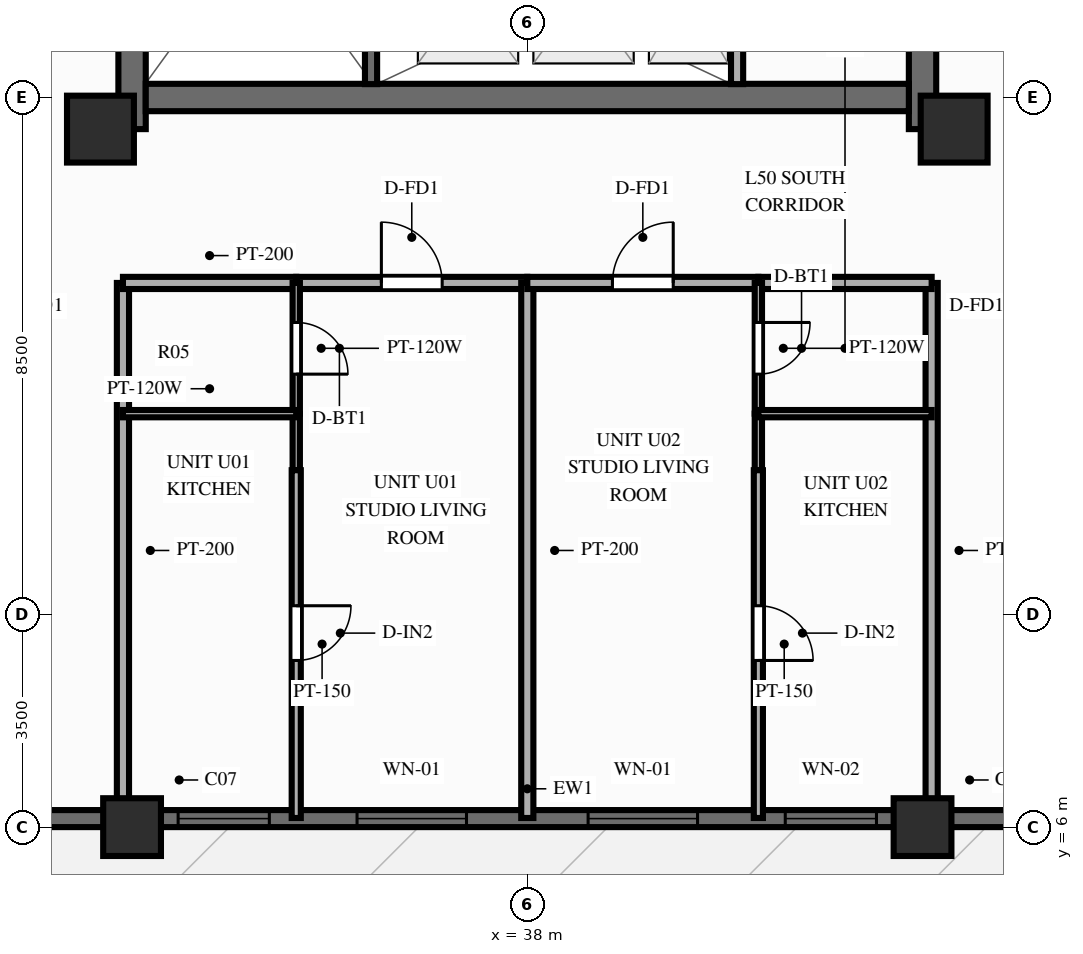
"""IFC4 building model, lengths in metres.
Left out: names, types, materials, properties, quantities, classifications, styles, units other than length and angle.
Written with IfcOpenShell. Run it as: python <this file> out.ifc"""

import sys

from ifc_helpers import new_model, si_unit, direction, frame, frame_2d, origin, origin_2d, place, context, subcontext, project, spatial, rectangle, extrude, source, transform, mapped, element, fill, save


model = new_model("IFC4")
c1 = context("Model", 3, precision=1e-05, world=origin(), true_north=direction((0.0, 1.0)))
c2 = subcontext(c1, "Body", "Model", "MODEL_VIEW")
j1 = project(units=[si_unit("LENGTHUNIT", "METRE"), si_unit("PLANEANGLEUNIT", "RADIAN")], contexts=[c1])
p1 = place(None, origin())
s1 = spatial("IfcSite", under=j1, at=p1, CompositionType="ELEMENT")
p2 = place(p1, origin())
s2 = spatial("IfcBuilding", under=s1, at=p2, CompositionType="ELEMENT")
p3 = place(p2, frame((0.0, 0.0, 159.1)))
s3 = spatial("IfcBuildingStorey", under=s2, at=p3, CompositionType="ELEMENT", Elevation=159.1)
p4 = place(p3, frame((31.5, 17.48, 0.0), z_axis=(0.0, 0.0, 1.0), x_axis=(0.0, 1.0, 0.0)))
e1 = element("IfcWall", 1, at=p4, inside=s3, PredefinedType="SHEAR", context=c2, shape_type="SweptSolid", body=[
    extrude(rectangle(XDim=19.04, YDim=0.45, at=frame_2d((9.52, 0.0))), origin(), (0.0, 0.0, 1.0), 3.9),
])
p5 = place(p4, frame((6.32, 0.0, 0.0)))
e2 = element("IfcOpeningElement", 2, at=p5, cuts=e1, PredefinedType="OPENING", context=c2, shape_type="SweptSolid", body=[
    extrude(rectangle(XDim=1.1, YDim=2.15, at=frame_2d((0.55, 1.075))), frame((0.0, 0.237, 0.0), z_axis=(0.0, -1.0, 0.0), x_axis=(1.0, 0.0, 0.0)), (0.0, 0.0, 1.0), 0.474),
])
p6 = place(p3, frame((44.5, 17.48, 0.0), z_axis=(0.0, 0.0, 1.0), x_axis=(0.0, 1.0, 0.0)))
e3 = element("IfcWall", 3, at=p6, inside=s3, PredefinedType="SHEAR", context=c2, shape_type="SweptSolid", body=[
    extrude(rectangle(XDim=19.04, YDim=0.45, at=frame_2d((9.52, 0.0))), origin(), (0.0, 0.0, 1.0), 3.9),
])
p7 = place(p6, frame((12.67, 0.0, 0.0), z_axis=(0.0, 0.0, 1.0), x_axis=(-1.0, 0.0, 0.0)))
e4 = element("IfcOpeningElement", 4, at=p7, cuts=e3, PredefinedType="OPENING", context=c2, shape_type="SweptSolid", body=[
    extrude(rectangle(XDim=1.1, YDim=2.15, at=frame_2d((0.55, 1.075))), frame((0.0, 0.237, 0.0), z_axis=(0.0, -1.0, 0.0), x_axis=(1.0, 0.0, 0.0)), (0.0, 0.0, 1.0), 0.474),
])
p8 = place(p3, frame((31.725, 18.0, 0.0), z_axis=(0.0, 0.0, 1.0), x_axis=(1.0, 0.0, 0.0)))
e5 = element("IfcWall", 5, at=p8, inside=s3, PredefinedType="SHEAR", context=c2, shape_type="SweptSolid", body=[
    extrude(rectangle(XDim=12.55, YDim=0.45, at=frame_2d((6.275, 0.0))), origin(), (0.0, 0.0, 1.0), 3.9),
])
m1 = source(origin(), c2, "Body", "SweptSolid", [
    extrude(rectangle(XDim=1.1, YDim=1.1, at=origin_2d()), origin(), (0.0, 0.0, 1.0), 3.9),
])
for number, where, z_axis, x_axis in (
    (6, (30.98, 17.48, 0.0), (0.0, 0.0, 1.0), (1.0, 0.0, 0.0)),
    (7, (45.02, 17.48, 0.0), (0.0, 0.0, 1.0), (1.0, 0.0, 0.0)),
):
    element("IfcColumn", number, at=place(p3, frame(where, z_axis=z_axis, x_axis=x_axis)), inside=s3, PredefinedType="COLUMN", context=c2, shape_type="MappedRepresentation", body=[
        mapped(m1, transform((0.0, 0.0, 0.0), scale=1.0)),
    ])
m2 = source(origin(), c2, "Body", "SweptSolid", [
    extrude(rectangle(XDim=0.95, YDim=0.95, at=origin_2d()), origin(), (0.0, 0.0, 1.0), 3.9),
])
for number, where, z_axis, x_axis in (
    (8, (31.5, 6.0, 0.0), (0.0, 0.0, 1.0), (1.0, 0.0, 0.0)),
    (9, (44.5, 6.0, 0.0), (0.0, 0.0, 1.0), (1.0, 0.0, 0.0)),
):
    element("IfcColumn", number, at=place(p3, frame(where, z_axis=z_axis, x_axis=x_axis)), inside=s3, PredefinedType="COLUMN", context=c2, shape_type="MappedRepresentation", body=[
        mapped(m2, transform((0.0, 0.0, 0.0), scale=1.0)),
    ])
p9 = place(p3, frame((21.0, 6.14, 0.0), z_axis=(0.0, 0.0, 1.0), x_axis=(1.0, 0.0, 0.0)))
e10 = element("IfcWall", 10, at=p9, inside=s3, PredefinedType="SOLIDWALL", context=c2, shape_type="SweptSolid", body=[
    extrude(rectangle(XDim=34.0, YDim=0.28, at=frame_2d((17.0, 0.0))), origin(), (0.0, 0.0, 1.0), 2.79),
])
p10 = place(p9, frame((5.8, 0.0, 0.0), z_axis=(0.0, 0.0, 1.0), x_axis=(-1.0, 0.0, 0.0)))
e11 = element("IfcOpeningElement", 11, at=p10, cuts=e10, PredefinedType="OPENING", context=c2, shape_type="SweptSolid", body=[
    extrude(rectangle(XDim=1.1, YDim=2.15, at=frame_2d((0.55, 1.075))), frame((0.0, 0.152, 0.0), z_axis=(0.0, -1.0, 0.0), x_axis=(1.0, 0.0, 0.0)), (0.0, 0.0, 1.0), 0.304),
])
p11 = place(p9, frame((11.258, 0.0, 0.85)))
e12 = element("IfcOpeningElement", 12, at=p11, cuts=e10, PredefinedType="OPENING", context=c2, shape_type="SweptSolid", body=[
    extrude(rectangle(XDim=1.5, YDim=1.65, at=frame_2d((0.75, 0.825))), frame((0.0, 0.152, 0.0), z_axis=(0.0, -1.0, 0.0), x_axis=(1.0, 0.0, 0.0)), (0.0, 0.0, 1.0), 0.304),
])
p12 = place(p9, frame((14.2, 0.0, 0.85)))
e13 = element("IfcOpeningElement", 13, at=p12, cuts=e10, PredefinedType="OPENING", context=c2, shape_type="SweptSolid", body=[
    extrude(rectangle(XDim=1.8, YDim=1.65, at=frame_2d((0.9, 0.825))), frame((0.0, 0.152, 0.0), z_axis=(0.0, -1.0, 0.0), x_axis=(1.0, 0.0, 0.0)), (0.0, 0.0, 1.0), 0.304),
])
p13 = place(p9, frame((18.0, 0.0, 0.85)))
e14 = element("IfcOpeningElement", 14, at=p13, cuts=e10, PredefinedType="OPENING", context=c2, shape_type="SweptSolid", body=[
    extrude(rectangle(XDim=1.8, YDim=1.65, at=frame_2d((0.9, 0.825))), frame((0.0, 0.152, 0.0), z_axis=(0.0, -1.0, 0.0), x_axis=(1.0, 0.0, 0.0)), (0.0, 0.0, 1.0), 0.304),
])
p14 = place(p9, frame((21.242, 0.0, 0.85)))
e15 = element("IfcOpeningElement", 15, at=p14, cuts=e10, PredefinedType="OPENING", context=c2, shape_type="SweptSolid", body=[
    extrude(rectangle(XDim=1.5, YDim=1.65, at=frame_2d((0.75, 0.825))), frame((0.0, 0.152, 0.0), z_axis=(0.0, -1.0, 0.0), x_axis=(1.0, 0.0, 0.0)), (0.0, 0.0, 1.0), 0.304),
])
p15 = place(p9, frame((27.85, 0.0, 0.85)))
e16 = element("IfcOpeningElement", 16, at=p15, cuts=e10, PredefinedType="OPENING", context=c2, shape_type="SweptSolid", body=[
    extrude(rectangle(XDim=1.8, YDim=1.65, at=frame_2d((0.9, 0.825))), frame((0.0, 0.152, 0.0), z_axis=(0.0, -1.0, 0.0), x_axis=(1.0, 0.0, 0.0)), (0.0, 0.0, 1.0), 0.304),
])
p16 = place(p3, frame((41.45, 18.22, 0.0), z_axis=(0.0, 0.0, 1.0), x_axis=(0.0, 1.0, 0.0)))
e17 = element("IfcWall", 17, at=p16, inside=s3, PredefinedType="PARTITIONING", context=c2, shape_type="SweptSolid", body=[
    extrude(rectangle(XDim=2.86, YDim=0.2, at=frame_2d((1.43, 0.0))), origin(), (0.0, 0.0, 1.0), 3.69),
])
p17 = place(p3, frame((35.43, 18.22, 0.0), z_axis=(0.0, 0.0, 1.0), x_axis=(0.0, 1.0, 0.0)))
e18 = element("IfcWall", 18, at=p17, inside=s3, PredefinedType="SOLIDWALL", context=c2, shape_type="SweptSolid", body=[
    extrude(rectangle(XDim=7.22, YDim=0.2, at=frame_2d((3.61, 0.0))), origin(), (0.0, 0.0, 1.0), 3.69),
])
p18 = place(p17, frame((6.68, 0.0, 0.0), z_axis=(0.0, 0.0, 1.0), x_axis=(-1.0, 0.0, 0.0)))
e19 = element("IfcOpeningElement", 19, at=p18, cuts=e18, PredefinedType="OPENING", context=c2, shape_type="SweptSolid", body=[
    extrude(rectangle(XDim=1.1, YDim=2.15, at=frame_2d((0.55, 1.075))), frame((0.0, 0.112, 0.0), z_axis=(0.0, -1.0, 0.0), x_axis=(1.0, 0.0, 0.0)), (0.0, 0.0, 1.0), 0.224),
])
for number, where, z_axis, x_axis in (
    (20, (31.35, 14.95, 0.0), (0.0, 0.0, 1.0), (0.0, -1.0, 0.0)),
    (21, (44.65, 14.95, 0.0), (0.0, 0.0, 1.0), (0.0, -1.0, 0.0)),
):
    element("IfcWall", number, at=place(p3, frame(where, z_axis=z_axis, x_axis=x_axis)), inside=s3, PredefinedType="PARTITIONING", context=c2, shape_type="SweptSolid", body=[
        extrude(rectangle(XDim=8.8, YDim=0.2, at=frame_2d((4.4, 0.0))), origin(), (0.0, 0.0, 1.0), 2.79),
    ])
p19 = place(p3, frame((31.35, 14.95, 0.0), z_axis=(0.0, 0.0, 1.0), x_axis=(1.0, 0.0, 0.0)))
e22 = element("IfcWall", 22, at=p19, inside=s3, PredefinedType="PARTITIONING", context=c2, shape_type="SweptSolid", body=[
    extrude(rectangle(XDim=2.85, YDim=0.2, at=frame_2d((1.425, 0.0))), origin(), (0.0, 0.0, 1.0), 3.69),
])
p20 = place(p3, frame((34.2, 14.95, 0.0), z_axis=(0.0, 0.0, 1.0), x_axis=(1.0, 0.0, 0.0)))
e23 = element("IfcWall", 23, at=p20, inside=s3, PredefinedType="PARTITIONING", context=c2, shape_type="SweptSolid", body=[
    extrude(rectangle(XDim=3.8, YDim=0.2, at=frame_2d((1.9, 0.0))), origin(), (0.0, 0.0, 1.0), 3.69),
])
p21 = place(p20, frame((1.4, 0.0, 0.0)))
e24 = element("IfcOpeningElement", 24, at=p21, cuts=e23, PredefinedType="OPENING", context=c2, shape_type="SweptSolid", body=[
    extrude(rectangle(XDim=1.0, YDim=2.15, at=frame_2d((0.5, 1.075))), frame((0.0, 0.112, 0.0), z_axis=(0.0, -1.0, 0.0), x_axis=(1.0, 0.0, 0.0)), (0.0, 0.0, 1.0), 0.224),
])
p22 = place(p3, frame((34.2, 14.95, 0.0), z_axis=(0.0, 0.0, 1.0), x_axis=(0.0, -1.0, 0.0)))
e25 = element("IfcWall", 25, at=p22, inside=s3, PredefinedType="PARTITIONING", context=c2, shape_type="SweptSolid", body=[
    extrude(rectangle(XDim=2.15, YDim=0.12, at=frame_2d((1.075, 0.0))), origin(), (0.0, 0.0, 1.0), 3.69),
])
p23 = place(p22, frame((0.65, 0.0, 0.0)))
e26 = element("IfcOpeningElement", 26, at=p23, cuts=e25, PredefinedType="OPENING", context=c2, shape_type="SweptSolid", body=[
    extrude(rectangle(XDim=0.85, YDim=2.05, at=frame_2d((0.425, 1.025))), frame((0.0, 0.072, 0.0), z_axis=(0.0, -1.0, 0.0), x_axis=(1.0, 0.0, 0.0)), (0.0, 0.0, 1.0), 0.144),
])
p24 = place(p3, frame((34.2, 12.8, 0.0), z_axis=(0.0, 0.0, 1.0), x_axis=(0.0, -1.0, 0.0)))
e27 = element("IfcWall", 27, at=p24, inside=s3, PredefinedType="PARTITIONING", context=c2, shape_type="SweptSolid", body=[
    extrude(rectangle(XDim=0.93, YDim=0.12, at=frame_2d((0.465, 0.0))), origin(), (0.0, 0.0, 1.0), 3.69),
])
p25 = place(p3, frame((31.35, 12.8, 0.0), z_axis=(0.0, 0.0, 1.0), x_axis=(1.0, 0.0, 0.0)))
e28 = element("IfcWall", 28, at=p25, inside=s3, PredefinedType="PARTITIONING", context=c2, shape_type="SweptSolid", body=[
    extrude(rectangle(XDim=2.85, YDim=0.12, at=frame_2d((1.425, 0.0))), origin(), (0.0, 0.0, 1.0), 3.69),
])
p26 = place(p3, frame((34.2, 11.87, 0.0), z_axis=(0.0, 0.0, 1.0), x_axis=(0.0, -1.0, 0.0)))
e29 = element("IfcWall", 29, at=p26, inside=s3, PredefinedType="PARTITIONING", context=c2, shape_type="SweptSolid", body=[
    extrude(rectangle(XDim=5.72, YDim=0.15, at=frame_2d((2.86, 0.0))), origin(), (0.0, 0.0, 1.0), 3.69),
])
p27 = place(p26, frame((2.229, 0.0, 0.0)))
e30 = element("IfcOpeningElement", 30, at=p27, cuts=e29, PredefinedType="OPENING", context=c2, shape_type="SweptSolid", body=[
    extrude(rectangle(XDim=0.9, YDim=2.1, at=frame_2d((0.45, 1.05))), frame((0.0, 0.087, 0.0), z_axis=(0.0, -1.0, 0.0), x_axis=(1.0, 0.0, 0.0)), (0.0, 0.0, 1.0), 0.174),
])
p28 = place(p3, frame((38.0, 14.95, 0.0), z_axis=(0.0, 0.0, 1.0), x_axis=(0.0, -1.0, 0.0)))
e31 = element("IfcWall", 31, at=p28, inside=s3, PredefinedType="PARTITIONING", context=c2, shape_type="SweptSolid", body=[
    extrude(rectangle(XDim=8.8, YDim=0.2, at=frame_2d((4.4, 0.0))), origin(), (0.0, 0.0, 1.0), 3.69),
])
p29 = place(p3, frame((38.0, 14.95, 0.0), z_axis=(0.0, 0.0, 1.0), x_axis=(1.0, 0.0, 0.0)))
e32 = element("IfcWall", 32, at=p29, inside=s3, PredefinedType="PARTITIONING", context=c2, shape_type="SweptSolid", body=[
    extrude(rectangle(XDim=3.8, YDim=0.2, at=frame_2d((1.9, 0.0))), origin(), (0.0, 0.0, 1.0), 3.69),
])
p30 = place(p29, frame((1.4, 0.0, 0.0)))
e33 = element("IfcOpeningElement", 33, at=p30, cuts=e32, PredefinedType="OPENING", context=c2, shape_type="SweptSolid", body=[
    extrude(rectangle(XDim=1.0, YDim=2.15, at=frame_2d((0.5, 1.075))), frame((0.0, 0.112, 0.0), z_axis=(0.0, -1.0, 0.0), x_axis=(1.0, 0.0, 0.0)), (0.0, 0.0, 1.0), 0.224),
])
p31 = place(p3, frame((41.8, 14.95, 0.0), z_axis=(0.0, 0.0, 1.0), x_axis=(1.0, 0.0, 0.0)))
e34 = element("IfcWall", 34, at=p31, inside=s3, PredefinedType="PARTITIONING", context=c2, shape_type="SweptSolid", body=[
    extrude(rectangle(XDim=2.85, YDim=0.2, at=frame_2d((1.425, 0.0))), origin(), (0.0, 0.0, 1.0), 3.69),
])
p32 = place(p3, frame((41.8, 14.95, 0.0), z_axis=(0.0, 0.0, 1.0), x_axis=(0.0, -1.0, 0.0)))
e35 = element("IfcWall", 35, at=p32, inside=s3, PredefinedType="PARTITIONING", context=c2, shape_type="SweptSolid", body=[
    extrude(rectangle(XDim=2.15, YDim=0.12, at=frame_2d((1.075, 0.0))), origin(), (0.0, 0.0, 1.0), 3.69),
])
p33 = place(p32, frame((0.65, 0.0, 0.0)))
e36 = element("IfcOpeningElement", 36, at=p33, cuts=e35, PredefinedType="OPENING", context=c2, shape_type="SweptSolid", body=[
    extrude(rectangle(XDim=0.85, YDim=2.05, at=frame_2d((0.425, 1.025))), frame((0.0, 0.072, 0.0), z_axis=(0.0, -1.0, 0.0), x_axis=(1.0, 0.0, 0.0)), (0.0, 0.0, 1.0), 0.144),
])
p34 = place(p3, frame((41.8, 12.8, 0.0), z_axis=(0.0, 0.0, 1.0), x_axis=(0.0, -1.0, 0.0)))
e37 = element("IfcWall", 37, at=p34, inside=s3, PredefinedType="PARTITIONING", context=c2, shape_type="SweptSolid", body=[
    extrude(rectangle(XDim=0.93, YDim=0.12, at=frame_2d((0.465, 0.0))), origin(), (0.0, 0.0, 1.0), 3.69),
])
p35 = place(p3, frame((41.8, 12.8, 0.0), z_axis=(0.0, 0.0, 1.0), x_axis=(1.0, 0.0, 0.0)))
e38 = element("IfcWall", 38, at=p35, inside=s3, PredefinedType="PARTITIONING", context=c2, shape_type="SweptSolid", body=[
    extrude(rectangle(XDim=2.85, YDim=0.12, at=frame_2d((1.425, 0.0))), origin(), (0.0, 0.0, 1.0), 3.69),
])
p36 = place(p3, frame((41.8, 11.87, 0.0), z_axis=(0.0, 0.0, 1.0), x_axis=(0.0, -1.0, 0.0)))
e39 = element("IfcWall", 39, at=p36, inside=s3, PredefinedType="PARTITIONING", context=c2, shape_type="SweptSolid", body=[
    extrude(rectangle(XDim=5.72, YDim=0.15, at=frame_2d((2.86, 0.0))), origin(), (0.0, 0.0, 1.0), 3.69),
])
p37 = place(p36, frame((2.229, 0.0, 0.0)))
e40 = element("IfcOpeningElement", 40, at=p37, cuts=e39, PredefinedType="OPENING", context=c2, shape_type="SweptSolid", body=[
    extrude(rectangle(XDim=0.9, YDim=2.1, at=frame_2d((0.45, 1.05))), frame((0.0, 0.087, 0.0), z_axis=(0.0, -1.0, 0.0), x_axis=(1.0, 0.0, 0.0)), (0.0, 0.0, 1.0), 0.174),
])
m3 = source(origin(), c2, "Body", "SweptSolid", [
    extrude(rectangle(XDim=1.5, YDim=1.65, at=frame_2d((0.75, 0.825))), frame((0.0, 0.03, 0.0), z_axis=(0.0, -1.0, 0.0), x_axis=(1.0, 0.0, 0.0)), (0.0, 0.0, 1.0), 0.06),
])
p38 = place(p11, origin())
e41 = element("IfcWindow", 41, at=p38, inside=s3, PartitioningType="SINGLE_PANEL", PredefinedType="WINDOW", context=c2, shape_type="MappedRepresentation", body=[
    mapped(m3, transform((0.0, 0.0, 0.0), scale=1.0)),
])
fill(e12, e41)
m4 = source(origin(), c2, "Body", "SweptSolid", [
    extrude(rectangle(XDim=1.8, YDim=1.65, at=frame_2d((0.9, 0.825))), frame((0.0, 0.03, 0.0), z_axis=(0.0, -1.0, 0.0), x_axis=(1.0, 0.0, 0.0)), (0.0, 0.0, 1.0), 0.06),
])
p39 = place(p12, origin())
e42 = element("IfcWindow", 42, at=p39, inside=s3, PartitioningType="SINGLE_PANEL", PredefinedType="WINDOW", context=c2, shape_type="MappedRepresentation", body=[
    mapped(m4, transform((0.0, 0.0, 0.0), scale=1.0)),
])
fill(e13, e42)
p40 = place(p13, origin())
e43 = element("IfcWindow", 43, at=p40, inside=s3, PartitioningType="SINGLE_PANEL", PredefinedType="WINDOW", context=c2, shape_type="MappedRepresentation", body=[
    mapped(m4, transform((0.0, 0.0, 0.0), scale=1.0)),
])
fill(e14, e43)
p41 = place(p14, origin())
e44 = element("IfcWindow", 44, at=p41, inside=s3, PartitioningType="SINGLE_PANEL", PredefinedType="WINDOW", context=c2, shape_type="MappedRepresentation", body=[
    mapped(m3, transform((0.0, 0.0, 0.0), scale=1.0)),
])
fill(e15, e44)
m5 = source(origin(), c2, "Body", "SweptSolid", [
    extrude(rectangle(XDim=1.0, YDim=2.15, at=frame_2d((0.5, 1.075))), frame((0.0, 0.025, 0.0), z_axis=(0.0, -1.0, 0.0), x_axis=(1.0, 0.0, 0.0)), (0.0, 0.0, 1.0), 0.05),
])
p42 = place(p21, origin())
e45 = element("IfcDoor", 45, at=p42, inside=s3, OperationType="SINGLE_SWING_LEFT", PredefinedType="DOOR", context=c2, shape_type="MappedRepresentation", body=[
    mapped(m5, transform((0.0, 0.0, 0.0), scale=1.0)),
])
fill(e24, e45)
m6 = source(origin(), c2, "Body", "SweptSolid", [
    extrude(rectangle(XDim=0.85, YDim=2.05, at=frame_2d((0.425, 1.025))), frame((0.0, 0.025, 0.0), z_axis=(0.0, -1.0, 0.0), x_axis=(1.0, 0.0, 0.0)), (0.0, 0.0, 1.0), 0.05),
])
p43 = place(p23, origin())
e46 = element("IfcDoor", 46, at=p43, inside=s3, OperationType="SINGLE_SWING_RIGHT", PredefinedType="DOOR", context=c2, shape_type="MappedRepresentation", body=[
    mapped(m6, transform((0.0, 0.0, 0.0), scale=1.0)),
])
fill(e26, e46)
m7 = source(origin(), c2, "Body", "SweptSolid", [
    extrude(rectangle(XDim=0.9, YDim=2.1, at=frame_2d((0.45, 1.05))), frame((0.0, 0.025, 0.0), z_axis=(0.0, -1.0, 0.0), x_axis=(1.0, 0.0, 0.0)), (0.0, 0.0, 1.0), 0.05),
])
p44 = place(p27, origin())
e47 = element("IfcDoor", 47, at=p44, inside=s3, OperationType="SINGLE_SWING_LEFT", PredefinedType="DOOR", context=c2, shape_type="MappedRepresentation", body=[
    mapped(m7, transform((0.0, 0.0, 0.0), scale=1.0)),
])
fill(e30, e47)
p45 = place(p30, origin())
e48 = element("IfcDoor", 48, at=p45, inside=s3, OperationType="SINGLE_SWING_RIGHT", PredefinedType="DOOR", context=c2, shape_type="MappedRepresentation", body=[
    mapped(m5, transform((0.0, 0.0, 0.0), scale=1.0)),
])
fill(e33, e48)
p46 = place(p33, origin())
e49 = element("IfcDoor", 49, at=p46, inside=s3, OperationType="SINGLE_SWING_LEFT", PredefinedType="DOOR", context=c2, shape_type="MappedRepresentation", body=[
    mapped(m6, transform((0.0, 0.0, 0.0), scale=1.0)),
])
fill(e36, e49)
p47 = place(p37, origin())
e50 = element("IfcDoor", 50, at=p47, inside=s3, OperationType="SINGLE_SWING_RIGHT", PredefinedType="DOOR", context=c2, shape_type="MappedRepresentation", body=[
    mapped(m7, transform((0.0, 0.0, 0.0), scale=1.0)),
])
fill(e40, e50)
save(model, sys.argv[1])
